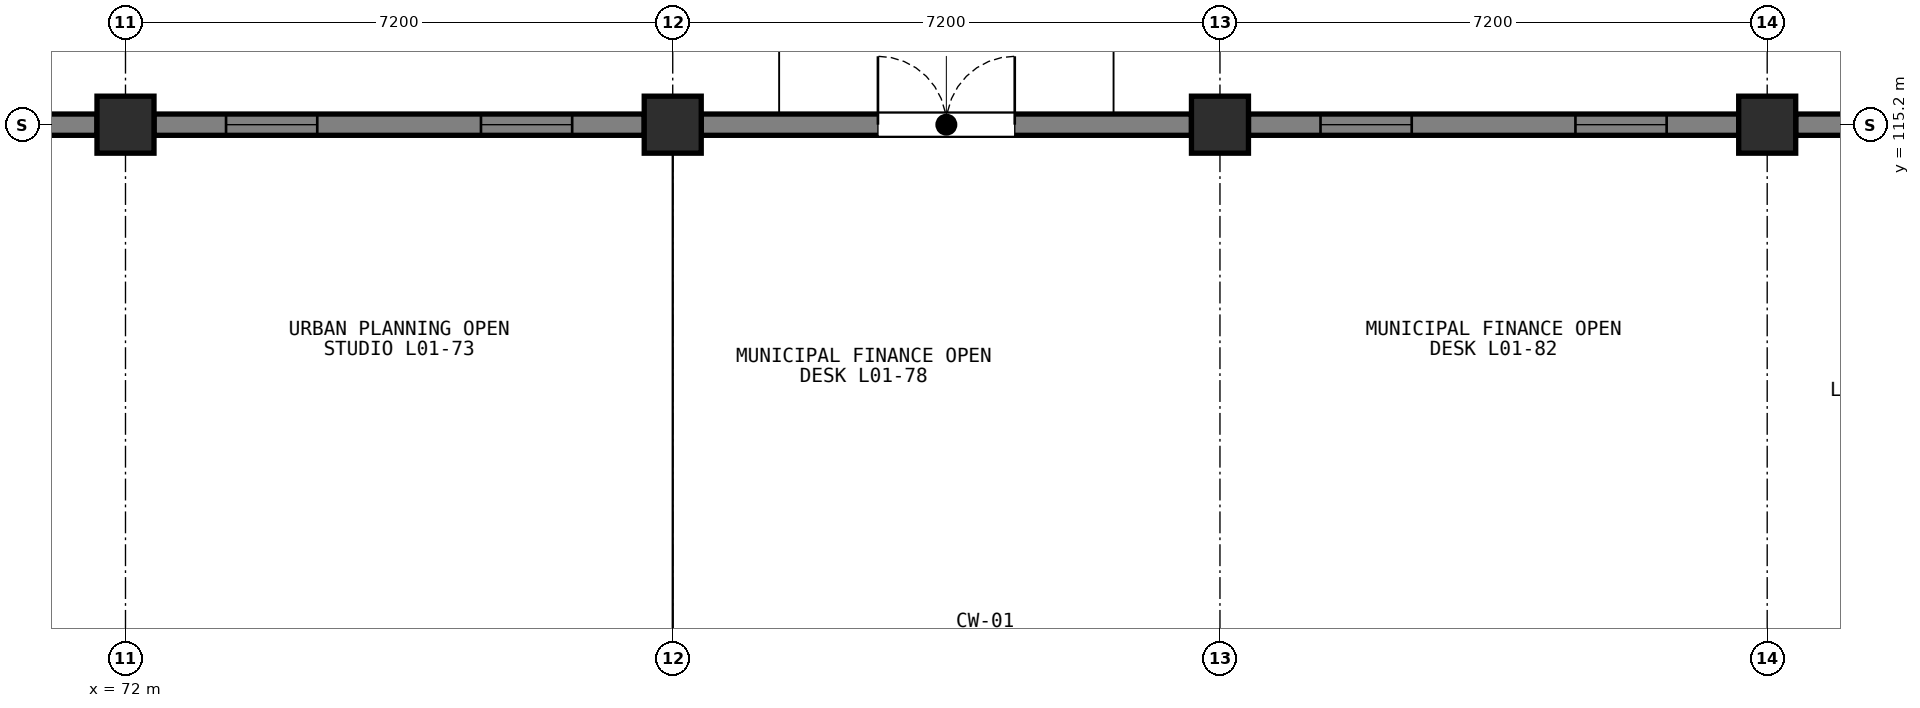
"""IFC4 building model, lengths in metres.
Left out: names, types, materials, properties, quantities, classifications, styles, units other than length and angle.
Written with IfcOpenShell. Run it as: python <this file> out.ifc"""

import sys

from ifc_helpers import new_model, si_unit, direction, frame, frame_2d, origin, origin_2d, place, context, subcontext, project, spatial, rectangle, extrude, element, fill, save


model = new_model("IFC4")
c1 = context("Model", 3, precision=1e-05, world=origin(), true_north=direction((0.0, 1.0)))
c2 = subcontext(c1, "Body", "Model", "MODEL_VIEW")
j1 = project(units=[si_unit("LENGTHUNIT", "METRE"), si_unit("PLANEANGLEUNIT", "RADIAN")], contexts=[c1])
p1 = place(None, origin())
s1 = spatial("IfcSite", under=j1, at=p1, CompositionType="ELEMENT")
p2 = place(p1, origin())
s2 = spatial("IfcBuilding", under=s1, at=p2, CompositionType="ELEMENT")
p3 = place(p2, origin())
s3 = spatial("IfcBuildingStorey", under=s2, at=p3, CompositionType="ELEMENT", Elevation=0.0)
for number, where, z_axis, x_axis in (
    (1, (72.0, 115.2, 0.0), (0.0, 0.0, 1.0), (1.0, 0.0, 0.0)),
    (2, (79.2, 115.2, 0.0), (0.0, 0.0, 1.0), (1.0, 0.0, 0.0)),
    (3, (86.4, 115.2, 0.0), (0.0, 0.0, 1.0), (1.0, 0.0, 0.0)),
    (4, (93.6, 115.2, 0.0), (0.0, 0.0, 1.0), (1.0, 0.0, 0.0)),
):
    element("IfcColumn", number, at=place(p3, frame(where, z_axis=z_axis, x_axis=x_axis)), inside=s3, PredefinedType="COLUMN", context=c2, shape_type="SweptSolid", body=[
        extrude(rectangle(XDim=0.75, YDim=0.75, at=origin_2d()), origin(), (0.0, 0.0, 1.0), 5.4),
    ])
p4 = place(p3, frame((65.175, 115.2, 0.0), z_axis=(0.0, 0.0, 1.0), x_axis=(1.0, 0.0, 0.0)))
e5 = element("IfcWall", 5, at=p4, inside=s3, PredefinedType="SOLIDWALL", context=c2, shape_type="SweptSolid", body=[
    extrude(rectangle(XDim=6.45, YDim=0.28, at=frame_2d((3.225, 0.0))), origin(), (0.0, 0.0, 1.0), 4.598),
])
p5 = place(p4, frame((2.025, 0.0, 0.0)))
e6 = element("IfcOpeningElement", 6, at=p5, cuts=e5, PredefinedType="OPENING", context=c2, shape_type="SweptSolid", body=[
    extrude(rectangle(XDim=2.4, YDim=2.8, at=frame_2d((1.2, 1.4))), frame((0.0, 0.15, 0.0), z_axis=(0.0, -1.0, 0.0), x_axis=(1.0, 0.0, 0.0)), (0.0, 0.0, 1.0), 0.3),
])
p6 = place(p3, frame((72.375, 115.2, 0.0), z_axis=(0.0, 0.0, 1.0), x_axis=(1.0, 0.0, 0.0)))
e7 = element("IfcWall", 7, at=p6, inside=s3, PredefinedType="SOLIDWALL", context=c2, shape_type="SweptSolid", body=[
    extrude(rectangle(XDim=6.45, YDim=0.28, at=frame_2d((3.225, 0.0))), origin(), (0.0, 0.0, 1.0), 4.598),
])
p7 = place(p6, frame((0.948, 0.0, 0.95)))
e8 = element("IfcOpeningElement", 8, at=p7, cuts=e7, PredefinedType="OPENING", context=c2, shape_type="SweptSolid", body=[
    extrude(rectangle(XDim=1.2, YDim=1.7, at=frame_2d((0.6, 0.85))), frame((0.0, 0.15, 0.0), z_axis=(0.0, -1.0, 0.0), x_axis=(1.0, 0.0, 0.0)), (0.0, 0.0, 1.0), 0.3),
])
p8 = place(p6, frame((4.302, 0.0, 0.95)))
e9 = element("IfcOpeningElement", 9, at=p8, cuts=e7, PredefinedType="OPENING", context=c2, shape_type="SweptSolid", body=[
    extrude(rectangle(XDim=1.2, YDim=1.7, at=frame_2d((0.6, 0.85))), frame((0.0, 0.15, 0.0), z_axis=(0.0, -1.0, 0.0), x_axis=(1.0, 0.0, 0.0)), (0.0, 0.0, 1.0), 0.3),
])
p9 = place(p3, frame((79.575, 115.2, 0.0), z_axis=(0.0, 0.0, 1.0), x_axis=(1.0, 0.0, 0.0)))
e10 = element("IfcWall", 10, at=p9, inside=s3, PredefinedType="SOLIDWALL", context=c2, shape_type="SweptSolid", body=[
    extrude(rectangle(XDim=6.45, YDim=0.28, at=frame_2d((3.225, 0.0))), origin(), (0.0, 0.0, 1.0), 4.598),
])
p10 = place(p9, frame((2.325, 0.0, 0.0)))
e11 = element("IfcOpeningElement", 11, at=p10, cuts=e10, PredefinedType="OPENING", context=c2, shape_type="SweptSolid", body=[
    extrude(rectangle(XDim=1.8, YDim=2.4, at=frame_2d((0.9, 1.2))), frame((0.0, 0.15, 0.0), z_axis=(0.0, -1.0, 0.0), x_axis=(1.0, 0.0, 0.0)), (0.0, 0.0, 1.0), 0.3),
])
p11 = place(p3, frame((86.775, 115.2, 0.0), z_axis=(0.0, 0.0, 1.0), x_axis=(1.0, 0.0, 0.0)))
e12 = element("IfcWall", 12, at=p11, inside=s3, PredefinedType="SOLIDWALL", context=c2, shape_type="SweptSolid", body=[
    extrude(rectangle(XDim=6.45, YDim=0.28, at=frame_2d((3.225, 0.0))), origin(), (0.0, 0.0, 1.0), 4.598),
])
p12 = place(p11, frame((0.948, 0.0, 0.95)))
e13 = element("IfcOpeningElement", 13, at=p12, cuts=e12, PredefinedType="OPENING", context=c2, shape_type="SweptSolid", body=[
    extrude(rectangle(XDim=1.2, YDim=1.7, at=frame_2d((0.6, 0.85))), frame((0.0, 0.15, 0.0), z_axis=(0.0, -1.0, 0.0), x_axis=(1.0, 0.0, 0.0)), (0.0, 0.0, 1.0), 0.3),
])
p13 = place(p11, frame((4.302, 0.0, 0.95)))
e14 = element("IfcOpeningElement", 14, at=p13, cuts=e12, PredefinedType="OPENING", context=c2, shape_type="SweptSolid", body=[
    extrude(rectangle(XDim=1.2, YDim=1.7, at=frame_2d((0.6, 0.85))), frame((0.0, 0.15, 0.0), z_axis=(0.0, -1.0, 0.0), x_axis=(1.0, 0.0, 0.0)), (0.0, 0.0, 1.0), 0.3),
])
p14 = place(p3, frame((93.975, 115.2, 0.0), z_axis=(0.0, 0.0, 1.0), x_axis=(1.0, 0.0, 0.0)))
e15 = element("IfcWall", 15, at=p14, inside=s3, PredefinedType="SOLIDWALL", context=c2, shape_type="SweptSolid", body=[
    extrude(rectangle(XDim=6.45, YDim=0.28, at=frame_2d((3.225, 0.0))), origin(), (0.0, 0.0, 1.0), 4.598),
])
p15 = place(p14, frame((2.025, 0.0, 0.0)))
e16 = element("IfcOpeningElement", 16, at=p15, cuts=e15, PredefinedType="OPENING", context=c2, shape_type="SweptSolid", body=[
    extrude(rectangle(XDim=2.4, YDim=2.8, at=frame_2d((1.2, 1.4))), frame((0.0, 0.15, 0.0), z_axis=(0.0, -1.0, 0.0), x_axis=(1.0, 0.0, 0.0)), (0.0, 0.0, 1.0), 0.3),
])
p16 = place(p7, origin())
e17 = element("IfcWindow", 17, at=p16, inside=s3, PartitioningType="SINGLE_PANEL", PredefinedType="WINDOW", context=c2, shape_type="SweptSolid", body=[
    extrude(rectangle(XDim=1.2, YDim=1.7, at=frame_2d((0.6, 0.85))), frame((0.0, 0.03, 0.0), z_axis=(0.0, -1.0, 0.0), x_axis=(1.0, 0.0, 0.0)), (0.0, 0.0, 1.0), 0.06),
])
fill(e8, e17)
p17 = place(p8, origin())
e18 = element("IfcWindow", 18, at=p17, inside=s3, PartitioningType="SINGLE_PANEL", PredefinedType="WINDOW", context=c2, shape_type="SweptSolid", body=[
    extrude(rectangle(XDim=1.2, YDim=1.7, at=frame_2d((0.6, 0.85))), frame((0.0, 0.03, 0.0), z_axis=(0.0, -1.0, 0.0), x_axis=(1.0, 0.0, 0.0)), (0.0, 0.0, 1.0), 0.06),
])
fill(e9, e18)
p18 = place(p10, origin())
e19 = element("IfcDoor", 19, at=p18, inside=s3, OperationType="DOUBLE_DOOR_SINGLE_SWING", PredefinedType="DOOR", context=c2, shape_type="SweptSolid", body=[
    extrude(rectangle(XDim=1.8, YDim=2.4, at=frame_2d((0.9, 1.2))), frame((0.0, 0.025, 0.0), z_axis=(0.0, -1.0, 0.0), x_axis=(1.0, 0.0, 0.0)), (0.0, 0.0, 1.0), 0.05),
])
fill(e11, e19)
p19 = place(p12, origin())
e20 = element("IfcWindow", 20, at=p19, inside=s3, PartitioningType="SINGLE_PANEL", PredefinedType="WINDOW", context=c2, shape_type="SweptSolid", body=[
    extrude(rectangle(XDim=1.2, YDim=1.7, at=frame_2d((0.6, 0.85))), frame((0.0, 0.03, 0.0), z_axis=(0.0, -1.0, 0.0), x_axis=(1.0, 0.0, 0.0)), (0.0, 0.0, 1.0), 0.06),
])
fill(e13, e20)
p20 = place(p13, origin())
e21 = element("IfcWindow", 21, at=p20, inside=s3, PartitioningType="SINGLE_PANEL", PredefinedType="WINDOW", context=c2, shape_type="SweptSolid", body=[
    extrude(rectangle(XDim=1.2, YDim=1.7, at=frame_2d((0.6, 0.85))), frame((0.0, 0.03, 0.0), z_axis=(0.0, -1.0, 0.0), x_axis=(1.0, 0.0, 0.0)), (0.0, 0.0, 1.0), 0.06),
])
fill(e14, e21)
save(model, sys.argv[1])
